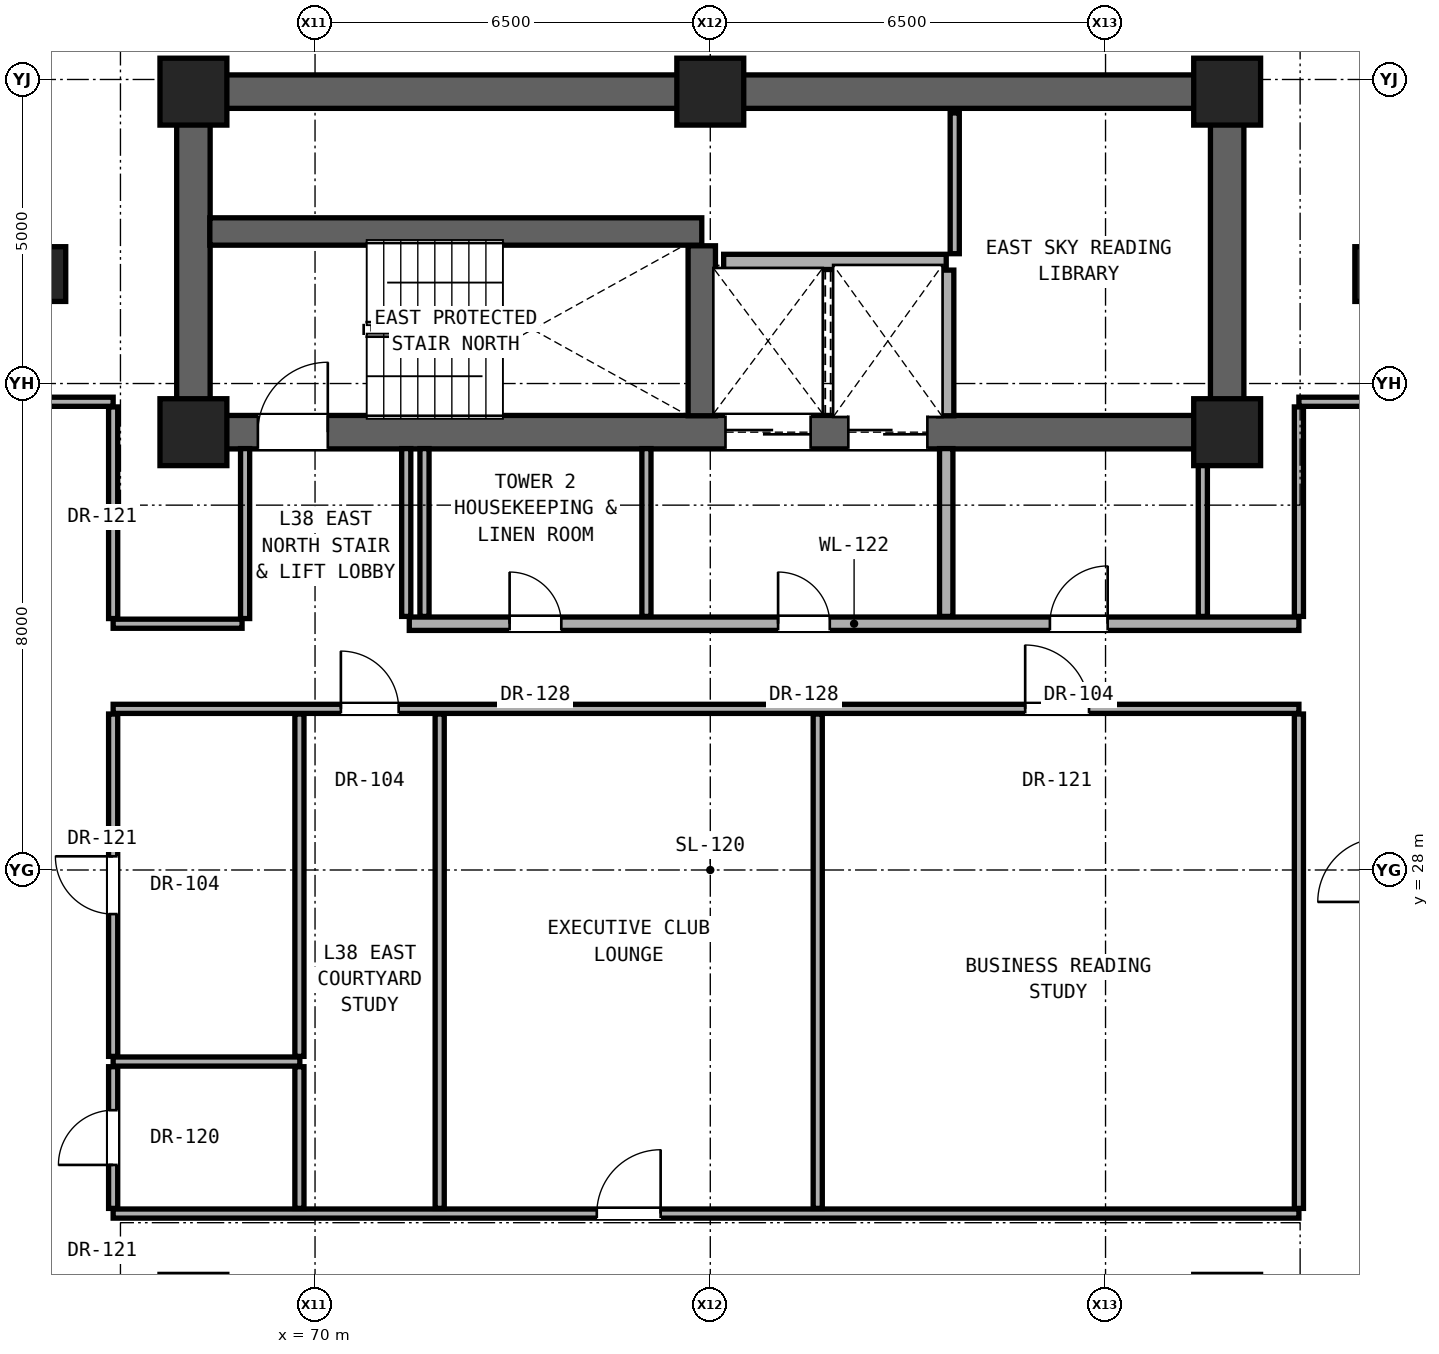
"""IFC4 building model, lengths in metres.
Left out: names, types, materials, properties, quantities, classifications, styles, units other than length and angle.
Written with IfcOpenShell. Run it as: python <this file> out.ifc"""

import sys

from ifc_helpers import new_model, si_unit, direction, frame, frame_2d, origin, origin_2d, place, context, subcontext, project, spatial, rectangle, extrude, element, fill, save


model = new_model("IFC4")
c1 = context("Model", 3, precision=1e-05, world=origin(), true_north=direction((0.0, 1.0)))
c2 = subcontext(c1, "Body", "Model", "MODEL_VIEW")
j1 = project(units=[si_unit("LENGTHUNIT", "METRE"), si_unit("PLANEANGLEUNIT", "RADIAN")], contexts=[c1])
p1 = place(None, origin())
s1 = spatial("IfcSite", under=j1, at=p1, CompositionType="ELEMENT")
p2 = place(p1, origin())
s2 = spatial("IfcBuilding", under=s1, at=p2, CompositionType="ELEMENT")
p3 = place(p2, frame((0.0, 0.0, 134.6)))
s3 = spatial("IfcBuildingStorey", under=s2, at=p3, CompositionType="ELEMENT", Elevation=134.6)
for number, where, z_axis, x_axis in (
    (1, (68.0, 35.2, 0.0), (0.0, 0.0, 1.0), (1.0, 0.0, 0.0)),
    (2, (85.0, 35.2, 0.0), (0.0, 0.0, 1.0), (1.0, 0.0, 0.0)),
    (3, (68.0, 40.8, 0.0), (0.0, 0.0, 1.0), (1.0, 0.0, 0.0)),
    (4, (76.5, 40.8, 0.0), (0.0, 0.0, 1.0), (1.0, 0.0, 0.0)),
    (5, (85.0, 40.8, 0.0), (0.0, 0.0, 1.0), (1.0, 0.0, 0.0)),
):
    element("IfcColumn", number, at=place(p3, frame(where, z_axis=z_axis, x_axis=x_axis)), inside=s3, PredefinedType="COLUMN", context=c2, shape_type="SweptSolid", body=[
        extrude(rectangle(XDim=1.1, YDim=1.1, at=origin_2d()), origin(), (0.0, 0.0, 1.0), 3.3),
    ])
for number, where, z_axis, x_axis in (
    (6, (65.6, 37.8, 0.0), (0.0, 0.0, 1.0), (1.0, 0.0, 0.0)),
    (7, (87.4, 37.8, 0.0), (0.0, 0.0, 1.0), (1.0, 0.0, 0.0)),
):
    element("IfcColumn", number, at=place(p3, frame(where, z_axis=z_axis, x_axis=x_axis)), inside=s3, PredefinedType="PILASTER", context=c2, shape_type="SweptSolid", body=[
        extrude(rectangle(XDim=0.6, YDim=0.9, at=origin_2d()), origin(), (0.0, 0.0, 1.0), 3.3),
    ])
p4 = place(p3, frame((68.0, 40.8, 0.0), z_axis=(0.0, 0.0, 1.0), x_axis=(1.0, 0.0, 0.0)))
e8 = element("IfcWall", 8, at=p4, inside=s3, PredefinedType="SHEAR", context=c2, shape_type="SweptSolid", body=[
    extrude(rectangle(XDim=17.0, YDim=0.55, at=frame_2d((8.5, 0.0))), origin(), (0.0, 0.0, 1.0), 3.08),
])
for number, where, z_axis, x_axis in (
    (9, (68.0, 35.2, 0.0), (0.0, 0.0, 1.0), (0.0, 1.0, 0.0)),
    (10, (85.0, 35.2, 0.0), (0.0, 0.0, 1.0), (0.0, 1.0, 0.0)),
):
    element("IfcWall", number, at=place(p3, frame(where, z_axis=z_axis, x_axis=x_axis)), inside=s3, PredefinedType="SHEAR", context=c2, shape_type="SweptSolid", body=[
        extrude(rectangle(XDim=5.6, YDim=0.55, at=frame_2d((2.8, 0.0))), origin(), (0.0, 0.0, 1.0), 3.08),
    ])
p5 = place(p3, frame((68.0, 35.2, 0.0), z_axis=(0.0, 0.0, 1.0), x_axis=(1.0, 0.0, 0.0)))
e11 = element("IfcWall", 11, at=p5, inside=s3, PredefinedType="SHEAR", context=c2, shape_type="SweptSolid", body=[
    extrude(rectangle(XDim=17.0, YDim=0.55, at=frame_2d((8.5, 0.0))), origin(), (0.0, 0.0, 1.0), 3.08),
])
p6 = place(p5, frame((1.06, 0.0, 0.0)))
e12 = element("IfcOpeningElement", 12, at=p6, cuts=e11, PredefinedType="OPENING", context=c2, shape_type="SweptSolid", body=[
    extrude(rectangle(XDim=1.15, YDim=2.2, at=frame_2d((0.575, 1.1))), frame((0.0, 0.285, 0.0), z_axis=(0.0, -1.0, 0.0), x_axis=(1.0, 0.0, 0.0)), (0.0, 0.0, 1.0), 0.57),
])
p7 = place(p5, frame((8.75, 0.0, 0.0)))
e13 = element("IfcOpeningElement", 13, at=p7, cuts=e11, PredefinedType="OPENING", context=c2, shape_type="SweptSolid", body=[
    extrude(rectangle(XDim=1.4, YDim=2.35, at=frame_2d((0.7, 1.175))), frame((0.0, 0.285, 0.0), z_axis=(0.0, -1.0, 0.0), x_axis=(1.0, 0.0, 0.0)), (0.0, 0.0, 1.0), 0.57),
])
p8 = place(p5, frame((10.77, 0.0, 0.0)))
e14 = element("IfcOpeningElement", 14, at=p8, cuts=e11, PredefinedType="OPENING", context=c2, shape_type="SweptSolid", body=[
    extrude(rectangle(XDim=1.3, YDim=2.3, at=frame_2d((0.65, 1.15))), frame((0.0, 0.285, 0.0), z_axis=(0.0, -1.0, 0.0), x_axis=(1.0, 0.0, 0.0)), (0.0, 0.0, 1.0), 0.57),
])
p9 = place(p3, frame((66.68, 22.35, 0.0), z_axis=(0.0, 0.0, 1.0), x_axis=(1.0, 0.0, 0.0)))
e15 = element("IfcWall", 15, at=p9, inside=s3, PredefinedType="PARTITIONING", context=c2, shape_type="SweptSolid", body=[
    extrude(rectangle(XDim=19.5, YDim=0.15, at=frame_2d((9.75, 0.0))), origin(), (0.0, 0.0, 1.0), 2.216),
])
p10 = place(p9, frame((7.954, 0.0, 0.0)))
e16 = element("IfcOpeningElement", 16, at=p10, cuts=e15, PredefinedType="OPENING", context=c2, shape_type="SweptSolid", body=[
    extrude(rectangle(XDim=1.05, YDim=2.2, at=frame_2d((0.525, 1.1))), frame((0.0, 0.085, 0.0), z_axis=(0.0, -1.0, 0.0), x_axis=(1.0, 0.0, 0.0)), (0.0, 0.0, 1.0), 0.17),
])
p11 = place(p3, frame((66.68, 24.85, 0.0), z_axis=(0.0, 0.0, 1.0), x_axis=(1.0, 0.0, 0.0)))
e17 = element("IfcWall", 17, at=p11, inside=s3, PredefinedType="PARTITIONING", context=c2, shape_type="SweptSolid", body=[
    extrude(rectangle(XDim=3.07, YDim=0.15, at=frame_2d((1.535, 0.0))), origin(), (0.0, 0.0, 1.0), 2.216),
])
p12 = place(p3, frame((66.68, 30.65, 0.0), z_axis=(0.0, 0.0, 1.0), x_axis=(1.0, 0.0, 0.0)))
e18 = element("IfcWall", 18, at=p12, inside=s3, PredefinedType="PARTITIONING", context=c2, shape_type="SweptSolid", body=[
    extrude(rectangle(XDim=19.5, YDim=0.15, at=frame_2d((9.75, 0.0))), origin(), (0.0, 0.0, 1.0), 2.216),
])
p13 = place(p12, frame((3.745, 0.0, 0.0)))
e19 = element("IfcOpeningElement", 19, at=p13, cuts=e18, PredefinedType="OPENING", context=c2, shape_type="SweptSolid", body=[
    extrude(rectangle(XDim=0.95, YDim=2.15, at=frame_2d((0.475, 1.075))), frame((0.0, 0.085, 0.0), z_axis=(0.0, -1.0, 0.0), x_axis=(1.0, 0.0, 0.0)), (0.0, 0.0, 1.0), 0.17),
])
p14 = place(p12, frame((14.999, 0.0, 0.0)))
e20 = element("IfcOpeningElement", 20, at=p14, cuts=e18, PredefinedType="OPENING", context=c2, shape_type="SweptSolid", body=[
    extrude(rectangle(XDim=1.05, YDim=2.2, at=frame_2d((0.525, 1.1))), frame((0.0, 0.085, 0.0), z_axis=(0.0, -1.0, 0.0), x_axis=(1.0, 0.0, 0.0)), (0.0, 0.0, 1.0), 0.17),
])
p15 = place(p3, frame((66.68, 32.05, 0.0), z_axis=(0.0, 0.0, 1.0), x_axis=(1.0, 0.0, 0.0)))
e21 = element("IfcWall", 21, at=p15, inside=s3, PredefinedType="PARTITIONING", context=c2, shape_type="SweptSolid", body=[
    extrude(rectangle(XDim=2.12, YDim=0.15, at=frame_2d((1.06, 0.0))), origin(), (0.0, 0.0, 1.0), 2.216),
])
p16 = place(p3, frame((71.55, 32.05, 0.0), z_axis=(0.0, 0.0, 1.0), x_axis=(1.0, 0.0, 0.0)))
e22 = element("IfcWall", 22, at=p16, inside=s3, PredefinedType="SOLIDWALL", context=c2, shape_type="SweptSolid", body=[
    extrude(rectangle(XDim=14.63, YDim=0.22, at=frame_2d((7.315, 0.0))), origin(), (0.0, 0.0, 1.0), 2.216),
])
p17 = place(p16, frame((6.065, 0.0, 0.0)))
e23 = element("IfcOpeningElement", 23, at=p17, cuts=e22, PredefinedType="OPENING", context=c2, shape_type="SweptSolid", body=[
    extrude(rectangle(XDim=0.85, YDim=2.01, at=frame_2d((0.425, 1.005))), frame((0.0, 0.12, 0.0), z_axis=(0.0, -1.0, 0.0), x_axis=(1.0, 0.0, 0.0)), (0.0, 0.0, 1.0), 0.24),
])
p18 = place(p16, frame((10.535, 0.0, 0.0)))
e24 = element("IfcOpeningElement", 24, at=p18, cuts=e22, PredefinedType="OPENING", context=c2, shape_type="SweptSolid", body=[
    extrude(rectangle(XDim=0.95, YDim=2.15, at=frame_2d((0.475, 1.075))), frame((0.0, 0.12, 0.0), z_axis=(0.0, -1.0, 0.0), x_axis=(1.0, 0.0, 0.0)), (0.0, 0.0, 1.0), 0.24),
])
p19 = place(p16, frame((1.65, 0.0, 0.0)))
e25 = element("IfcOpeningElement", 25, at=p19, cuts=e22, PredefinedType="OPENING", context=c2, shape_type="SweptSolid", body=[
    extrude(rectangle(XDim=0.85, YDim=2.01, at=frame_2d((0.425, 1.005))), frame((0.0, 0.12, 0.0), z_axis=(0.0, -1.0, 0.0), x_axis=(1.0, 0.0, 0.0)), (0.0, 0.0, 1.0), 0.24),
])
p20 = place(p3, frame((65.32, 35.7, 0.0), z_axis=(0.0, 0.0, 1.0), x_axis=(1.0, 0.0, 0.0)))
e26 = element("IfcWall", 26, at=p20, inside=s3, PredefinedType="PARTITIONING", context=c2, shape_type="SweptSolid", body=[
    extrude(rectangle(XDim=1.36, YDim=0.15, at=frame_2d((0.68, 0.0))), origin(), (0.0, 0.0, 1.0), 3.08),
])
p21 = place(p3, frame((86.18, 35.7, 0.0), z_axis=(0.0, 0.0, 1.0), x_axis=(1.0, 0.0, 0.0)))
e27 = element("IfcWall", 27, at=p21, inside=s3, PredefinedType="PARTITIONING", context=c2, shape_type="SweptSolid", body=[
    extrude(rectangle(XDim=1.36, YDim=0.15, at=frame_2d((0.68, 0.0))), origin(), (0.0, 0.0, 1.0), 3.08),
])
p22 = place(p3, frame((76.72, 38.0, 0.0), z_axis=(0.0, 0.0, 1.0), x_axis=(1.0, 0.0, 0.0)))
e28 = element("IfcWall", 28, at=p22, inside=s3, PredefinedType="SOLIDWALL", context=c2, shape_type="SweptSolid", body=[
    extrude(rectangle(XDim=3.66, YDim=0.25, at=frame_2d((1.83, 0.0))), origin(), (0.0, 0.0, 1.0), 3.08),
])
p23 = place(p3, frame((68.27, 38.5, 0.0), z_axis=(0.0, 0.0, 1.0), x_axis=(1.0, 0.0, 0.0)))
e29 = element("IfcWall", 29, at=p23, inside=s3, PredefinedType="SHEAR", context=c2, shape_type="SweptSolid", body=[
    extrude(rectangle(XDim=8.09, YDim=0.45, at=frame_2d((4.045, 0.0))), origin(), (0.0, 0.0, 1.0), 3.08),
])
p24 = place(p3, frame((66.68, 22.435, 0.0), z_axis=(0.0, 0.0, 1.0), x_axis=(0.0, 1.0, 0.0)))
e30 = element("IfcWall", 30, at=p24, inside=s3, PredefinedType="PARTITIONING", context=c2, shape_type="SweptSolid", body=[
    extrude(rectangle(XDim=2.33, YDim=0.15, at=frame_2d((1.165, 0.0))), origin(), (0.0, 0.0, 1.0), 3.08),
])
p25 = place(p24, frame((0.715, 0.0, 0.0)))
e31 = element("IfcOpeningElement", 31, at=p25, cuts=e30, PredefinedType="OPENING", context=c2, shape_type="SweptSolid", body=[
    extrude(rectangle(XDim=0.9, YDim=2.1, at=frame_2d((0.45, 1.05))), frame((0.0, 0.085, 0.0), z_axis=(0.0, -1.0, 0.0), x_axis=(1.0, 0.0, 0.0)), (0.0, 0.0, 1.0), 0.17),
])
p26 = place(p3, frame((66.68, 24.935, 0.0), z_axis=(0.0, 0.0, 1.0), x_axis=(0.0, 1.0, 0.0)))
e32 = element("IfcWall", 32, at=p26, inside=s3, PredefinedType="PARTITIONING", context=c2, shape_type="SweptSolid", body=[
    extrude(rectangle(XDim=5.63, YDim=0.15, at=frame_2d((2.815, 0.0))), origin(), (0.0, 0.0, 1.0), 2.376),
])
p27 = place(p26, frame((2.34, 0.0, 0.0)))
e33 = element("IfcOpeningElement", 33, at=p27, cuts=e32, PredefinedType="OPENING", context=c2, shape_type="SweptSolid", body=[
    extrude(rectangle(XDim=0.95, YDim=2.15, at=frame_2d((0.475, 1.075))), frame((0.0, 0.085, 0.0), z_axis=(0.0, -1.0, 0.0), x_axis=(1.0, 0.0, 0.0)), (0.0, 0.0, 1.0), 0.17),
])
p28 = place(p3, frame((66.68, 32.135, 0.0), z_axis=(0.0, 0.0, 1.0), x_axis=(0.0, 1.0, 0.0)))
e34 = element("IfcWall", 34, at=p28, inside=s3, PredefinedType="PARTITIONING", context=c2, shape_type="SweptSolid", body=[
    extrude(rectangle(XDim=3.48, YDim=0.15, at=frame_2d((1.74, 0.0))), origin(), (0.0, 0.0, 1.0), 2.472),
])
p29 = place(p3, frame((68.85, 32.135, 0.0), z_axis=(0.0, 0.0, 1.0), x_axis=(0.0, 1.0, 0.0)))
e35 = element("IfcWall", 35, at=p29, inside=s3, PredefinedType="PARTITIONING", context=c2, shape_type="SweptSolid", body=[
    extrude(rectangle(XDim=2.795, YDim=0.15, at=frame_2d((1.397, 0.0))), origin(), (0.0, 0.0, 1.0), 3.08),
])
p30 = place(p3, frame((69.743, 22.435, 0.0), z_axis=(0.0, 0.0, 1.0), x_axis=(0.0, 1.0, 0.0)))
e36 = element("IfcWall", 36, at=p30, inside=s3, PredefinedType="PARTITIONING", context=c2, shape_type="SweptSolid", body=[
    extrude(rectangle(XDim=2.33, YDim=0.15, at=frame_2d((1.165, 0.0))), origin(), (0.0, 0.0, 1.0), 3.08),
])
p31 = place(p3, frame((69.743, 24.935, 0.0), z_axis=(0.0, 0.0, 1.0), x_axis=(0.0, 1.0, 0.0)))
e37 = element("IfcWall", 37, at=p31, inside=s3, PredefinedType="PARTITIONING", context=c2, shape_type="SweptSolid", body=[
    extrude(rectangle(XDim=5.63, YDim=0.15, at=frame_2d((2.815, 0.0))), origin(), (0.0, 0.0, 1.0), 2.216),
])
for number, where, z_axis, x_axis in (
    (38, (71.5, 32.17, 0.0), (0.0, 0.0, 1.0), (0.0, 1.0, 0.0)),
    (39, (71.8, 32.17, 0.0), (0.0, 0.0, 1.0), (0.0, 1.0, 0.0)),
):
    element("IfcWall", number, at=place(p3, frame(where, z_axis=z_axis, x_axis=x_axis)), inside=s3, PredefinedType="PARTITIONING", context=c2, shape_type="SweptSolid", body=[
        extrude(rectangle(XDim=2.76, YDim=0.15, at=frame_2d((1.38, 0.0))), origin(), (0.0, 0.0, 1.0), 3.08),
    ])
p32 = place(p3, frame((72.05, 22.435, 0.0), z_axis=(0.0, 0.0, 1.0), x_axis=(0.0, 1.0, 0.0)))
e40 = element("IfcWall", 40, at=p32, inside=s3, PredefinedType="PARTITIONING", context=c2, shape_type="SweptSolid", body=[
    extrude(rectangle(XDim=8.13, YDim=0.15, at=frame_2d((4.065, 0.0))), origin(), (0.0, 0.0, 1.0), 2.216),
])
p33 = place(p3, frame((75.45, 32.17, 0.0), z_axis=(0.0, 0.0, 1.0), x_axis=(0.0, 1.0, 0.0)))
e41 = element("IfcWall", 41, at=p33, inside=s3, PredefinedType="PARTITIONING", context=c2, shape_type="SweptSolid", body=[
    extrude(rectangle(XDim=2.76, YDim=0.15, at=frame_2d((1.38, 0.0))), origin(), (0.0, 0.0, 1.0), 3.08),
])
p34 = place(p3, frame((76.36, 35.47, 0.0), z_axis=(0.0, 0.0, 1.0), x_axis=(0.0, 1.0, 0.0)))
e42 = element("IfcWall", 42, at=p34, inside=s3, PredefinedType="SHEAR", context=c2, shape_type="SweptSolid", body=[
    extrude(rectangle(XDim=2.795, YDim=0.45, at=frame_2d((1.397, 0.0))), origin(), (0.0, 0.0, 1.0), 3.08),
])
p35 = place(p3, frame((78.267, 22.435, 0.0), z_axis=(0.0, 0.0, 1.0), x_axis=(0.0, 1.0, 0.0)))
e43 = element("IfcWall", 43, at=p35, inside=s3, PredefinedType="PARTITIONING", context=c2, shape_type="SweptSolid", body=[
    extrude(rectangle(XDim=8.13, YDim=0.15, at=frame_2d((4.065, 0.0))), origin(), (0.0, 0.0, 1.0), 2.216),
])
p36 = place(p3, frame((80.38, 32.17, 0.0), z_axis=(0.0, 0.0, 1.0), x_axis=(0.0, 1.0, 0.0)))
e44 = element("IfcWall", 44, at=p36, inside=s3, PredefinedType="SOLIDWALL", context=c2, shape_type="SweptSolid", body=[
    extrude(rectangle(XDim=2.76, YDim=0.22, at=frame_2d((1.38, 0.0))), origin(), (0.0, 0.0, 1.0), 3.08),
])
p37 = place(p3, frame((80.38, 35.47, 0.0), z_axis=(0.0, 0.0, 1.0), x_axis=(0.0, 1.0, 0.0)))
e45 = element("IfcWall", 45, at=p37, inside=s3, PredefinedType="SOLIDWALL", context=c2, shape_type="SweptSolid", body=[
    extrude(rectangle(XDim=2.395, YDim=0.25, at=frame_2d((1.198, 0.0))), origin(), (0.0, 0.0, 1.0), 3.08),
])
p38 = place(p3, frame((80.52, 38.135, 0.0), z_axis=(0.0, 0.0, 1.0), x_axis=(0.0, 1.0, 0.0)))
e46 = element("IfcWall", 46, at=p38, inside=s3, PredefinedType="PARTITIONING", context=c2, shape_type="SweptSolid", body=[
    extrude(rectangle(XDim=2.315, YDim=0.15, at=frame_2d((1.157, 0.0))), origin(), (0.0, 0.0, 1.0), 3.08),
])
p39 = place(p3, frame((84.6, 32.17, 0.0), z_axis=(0.0, 0.0, 1.0), x_axis=(0.0, 1.0, 0.0)))
e47 = element("IfcWall", 47, at=p39, inside=s3, PredefinedType="PARTITIONING", context=c2, shape_type="SweptSolid", body=[
    extrude(rectangle(XDim=2.76, YDim=0.15, at=frame_2d((1.38, 0.0))), origin(), (0.0, 0.0, 1.0), 3.08),
])
p40 = place(p3, frame((86.18, 22.435, 0.0), z_axis=(0.0, 0.0, 1.0), x_axis=(0.0, 1.0, 0.0)))
e48 = element("IfcWall", 48, at=p40, inside=s3, PredefinedType="PARTITIONING", context=c2, shape_type="SweptSolid", body=[
    extrude(rectangle(XDim=8.13, YDim=0.15, at=frame_2d((4.065, 0.0))), origin(), (0.0, 0.0, 1.0), 2.376),
])
p41 = place(p3, frame((86.18, 32.17, 0.0), z_axis=(0.0, 0.0, 1.0), x_axis=(0.0, 1.0, 0.0)))
e49 = element("IfcWall", 49, at=p41, inside=s3, PredefinedType="PARTITIONING", context=c2, shape_type="SweptSolid", body=[
    extrude(rectangle(XDim=3.445, YDim=0.15, at=frame_2d((1.723, 0.0))), origin(), (0.0, 0.0, 1.0), 2.472),
])
p42 = place(p6, origin())
e50 = element("IfcDoor", 50, at=p42, inside=s3, OperationType="SINGLE_SWING_RIGHT", PredefinedType="DOOR", context=c2, shape_type="SweptSolid", body=[
    extrude(rectangle(XDim=1.15, YDim=2.2, at=frame_2d((0.575, 1.1))), frame((0.0, 0.025, 0.0), z_axis=(0.0, -1.0, 0.0), x_axis=(1.0, 0.0, 0.0)), (0.0, 0.0, 1.0), 0.05),
])
fill(e12, e50)
p43 = place(p17, origin())
e51 = element("IfcDoor", 51, at=p43, inside=s3, OperationType="SINGLE_SWING_LEFT", PredefinedType="DOOR", context=c2, shape_type="SweptSolid", body=[
    extrude(rectangle(XDim=0.85, YDim=2.01, at=frame_2d((0.425, 1.005))), frame((0.0, 0.025, 0.0), z_axis=(0.0, -1.0, 0.0), x_axis=(1.0, 0.0, 0.0)), (0.0, 0.0, 1.0), 0.05),
])
fill(e23, e51)
p44 = place(p18, origin())
e52 = element("IfcDoor", 52, at=p44, inside=s3, OperationType="SINGLE_SWING_RIGHT", PredefinedType="DOOR", context=c2, shape_type="SweptSolid", body=[
    extrude(rectangle(XDim=0.95, YDim=2.15, at=frame_2d((0.475, 1.075))), frame((0.0, 0.025, 0.0), z_axis=(0.0, -1.0, 0.0), x_axis=(1.0, 0.0, 0.0)), (0.0, 0.0, 1.0), 0.05),
])
fill(e24, e52)
p45 = place(p19, origin())
e53 = element("IfcDoor", 53, at=p45, inside=s3, OperationType="SINGLE_SWING_LEFT", PredefinedType="DOOR", context=c2, shape_type="SweptSolid", body=[
    extrude(rectangle(XDim=0.85, YDim=2.01, at=frame_2d((0.425, 1.005))), frame((0.0, 0.025, 0.0), z_axis=(0.0, -1.0, 0.0), x_axis=(1.0, 0.0, 0.0)), (0.0, 0.0, 1.0), 0.05),
])
fill(e25, e53)
p46 = place(p25, origin())
e54 = element("IfcDoor", 54, at=p46, inside=s3, OperationType="SINGLE_SWING_LEFT", PredefinedType="DOOR", context=c2, shape_type="SweptSolid", body=[
    extrude(rectangle(XDim=0.9, YDim=2.1, at=frame_2d((0.45, 1.05))), frame((0.0, 0.025, 0.0), z_axis=(0.0, -1.0, 0.0), x_axis=(1.0, 0.0, 0.0)), (0.0, 0.0, 1.0), 0.05),
])
fill(e31, e54)
p47 = place(p27, origin())
e55 = element("IfcDoor", 55, at=p47, inside=s3, OperationType="SINGLE_SWING_RIGHT", PredefinedType="DOOR", context=c2, shape_type="SweptSolid", body=[
    extrude(rectangle(XDim=0.95, YDim=2.15, at=frame_2d((0.475, 1.075))), frame((0.0, 0.025, 0.0), z_axis=(0.0, -1.0, 0.0), x_axis=(1.0, 0.0, 0.0)), (0.0, 0.0, 1.0), 0.05),
])
fill(e33, e55)
p48 = place(p13, origin())
e56 = element("IfcDoor", 56, at=p48, inside=s3, OperationType="SINGLE_SWING_LEFT", PredefinedType="DOOR", context=c2, shape_type="SweptSolid", body=[
    extrude(rectangle(XDim=0.95, YDim=2.15, at=frame_2d((0.475, 1.075))), frame((0.0, 0.025, 0.0), z_axis=(0.0, -1.0, 0.0), x_axis=(1.0, 0.0, 0.0)), (0.0, 0.0, 1.0), 0.05),
])
fill(e19, e56)
p49 = place(p10, origin())
e57 = element("IfcDoor", 57, at=p49, inside=s3, OperationType="SINGLE_SWING_RIGHT", PredefinedType="DOOR", context=c2, shape_type="SweptSolid", body=[
    extrude(rectangle(XDim=1.05, YDim=2.2, at=frame_2d((0.525, 1.1))), frame((0.0, 0.025, 0.0), z_axis=(0.0, -1.0, 0.0), x_axis=(1.0, 0.0, 0.0)), (0.0, 0.0, 1.0), 0.05),
])
fill(e16, e57)
p50 = place(p14, origin())
e58 = element("IfcDoor", 58, at=p50, inside=s3, OperationType="SINGLE_SWING_LEFT", PredefinedType="DOOR", context=c2, shape_type="SweptSolid", body=[
    extrude(rectangle(XDim=1.05, YDim=2.2, at=frame_2d((0.525, 1.1))), frame((0.0, 0.025, 0.0), z_axis=(0.0, -1.0, 0.0), x_axis=(1.0, 0.0, 0.0)), (0.0, 0.0, 1.0), 0.05),
])
fill(e20, e58)
p51 = place(p7, origin())
e59 = element("IfcDoor", 59, at=p51, inside=s3, OperationType="DOUBLE_DOOR_SLIDING", PredefinedType="DOOR", context=c2, shape_type="SweptSolid", body=[
    extrude(rectangle(XDim=1.4, YDim=2.35, at=frame_2d((0.7, 1.175))), frame((0.0, 0.025, 0.0), z_axis=(0.0, -1.0, 0.0), x_axis=(1.0, 0.0, 0.0)), (0.0, 0.0, 1.0), 0.05),
])
fill(e13, e59)
p52 = place(p8, origin())
e60 = element("IfcDoor", 60, at=p52, inside=s3, OperationType="DOUBLE_DOOR_SLIDING", PredefinedType="DOOR", context=c2, shape_type="SweptSolid", body=[
    extrude(rectangle(XDim=1.3, YDim=2.3, at=frame_2d((0.65, 1.15))), frame((0.0, 0.025, 0.0), z_axis=(0.0, -1.0, 0.0), x_axis=(1.0, 0.0, 0.0)), (0.0, 0.0, 1.0), 0.05),
])
fill(e14, e60)
save(model, sys.argv[1])
